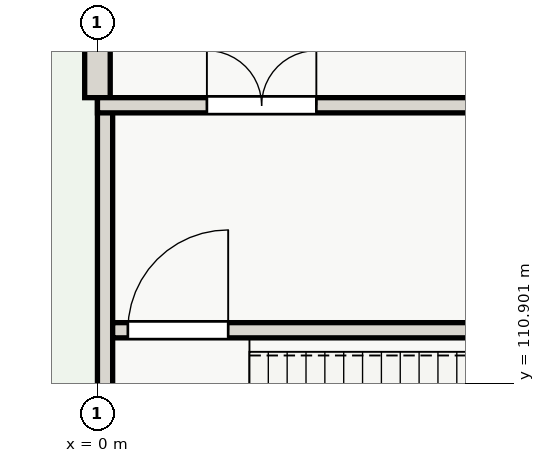
"""IFC4 building model, lengths in metres.
Left out: names, types, materials, properties, quantities, classifications, styles, units other than length and angle.
Written with IfcOpenShell. Run it as: python <this file> out.ifc"""

import sys

from ifc_helpers import new_model, si_unit, direction, frame, frame_2d, origin, place, context, subcontext, project, spatial, rectangle, extrude, element, fill, save


model = new_model("IFC4")
c1 = context("Model", 3, precision=1e-05, world=origin(), true_north=direction((0.0, 1.0)))
c2 = subcontext(c1, "Body", "Model", "MODEL_VIEW")
j1 = project(units=[si_unit("LENGTHUNIT", "METRE"), si_unit("PLANEANGLEUNIT", "RADIAN")], contexts=[c1])
p1 = place(None, origin())
s1 = spatial("IfcSite", under=j1, at=p1, CompositionType="ELEMENT")
p2 = place(p1, origin())
s2 = spatial("IfcBuilding", under=s1, at=p2, CompositionType="ELEMENT")
p3 = place(p2, origin())
s3 = spatial("IfcBuildingStorey", under=s2, at=p3, CompositionType="ELEMENT", Elevation=0.0)
p4 = place(p3, frame((0.0, 115.6, 0.0), z_axis=(0.0, 0.0, 1.0), x_axis=(0.0, 1.0, 0.0)))
e1 = element("IfcWall", 1, at=p4, inside=s3, PredefinedType="SOLIDWALL", context=c2, shape_type="SweptSolid", body=[
    extrude(rectangle(XDim=4.4, YDim=0.42, at=frame_2d((2.2, 0.0))), origin(), (0.0, 0.0, 1.0), 3.35),
])
p5 = place(p4, frame((1.3, 0.0, 0.9)))
e2 = element("IfcOpeningElement", 2, at=p5, cuts=e1, PredefinedType="OPENING", context=c2, shape_type="SweptSolid", body=[
    extrude(rectangle(XDim=1.8, YDim=2.05, at=frame_2d((0.9, 1.025))), frame((0.0, 0.22, 0.0), z_axis=(0.0, -1.0, 0.0), x_axis=(1.0, 0.0, 0.0)), (0.0, 0.0, 1.0), 0.44),
])
p6 = place(p3, frame((0.125, 106.4, 0.0), z_axis=(0.0, 0.0, 1.0), x_axis=(0.0, 1.0, 0.0)))
e3 = element("IfcWall", 3, at=p6, inside=s3, PredefinedType="SHEAR", context=c2, shape_type="SweptSolid", body=[
    extrude(rectangle(XDim=9.2, YDim=0.25, at=frame_2d((4.6, 0.0))), origin(), (0.0, 0.0, 1.0), 4.2),
])
p7 = place(p6, frame((1.4, 0.0, 0.0)))
e4 = element("IfcOpeningElement", 4, at=p7, cuts=e3, PredefinedType="OPENING", context=c2, shape_type="SweptSolid", body=[
    extrude(rectangle(XDim=1.9, YDim=2.2, at=frame_2d((0.95, 1.1))), frame((0.0, 0.135, 0.0), z_axis=(0.0, -1.0, 0.0), x_axis=(1.0, 0.0, 0.0)), (0.0, 0.0, 1.0), 0.27),
])
p8 = place(p3, frame((0.0, 115.475, 0.0), z_axis=(0.0, 0.0, 1.0), x_axis=(1.0, 0.0, 0.0)))
e5 = element("IfcWall", 5, at=p8, inside=s3, PredefinedType="SHEAR", context=c2, shape_type="SweptSolid", body=[
    extrude(rectangle(XDim=9.2, YDim=0.25, at=frame_2d((4.6, 0.0))), origin(), (0.0, 0.0, 1.0), 4.2),
])
p9 = place(p8, frame((1.8, 0.0, 0.0)))
e6 = element("IfcOpeningElement", 6, at=p9, cuts=e5, PredefinedType="OPENING", context=c2, shape_type="SweptSolid", body=[
    extrude(rectangle(XDim=1.8, YDim=2.15, at=frame_2d((0.9, 1.075))), frame((0.0, 0.135, 0.0), z_axis=(0.0, -1.0, 0.0), x_axis=(1.0, 0.0, 0.0)), (0.0, 0.0, 1.0), 0.27),
])
p10 = place(p3, frame((0.25, 111.775, 0.0), z_axis=(0.0, 0.0, 1.0), x_axis=(1.0, 0.0, 0.0)))
e7 = element("IfcWall", 7, at=p10, inside=s3, PredefinedType="SHEAR", context=c2, shape_type="SweptSolid", body=[
    extrude(rectangle(XDim=8.7, YDim=0.25, at=frame_2d((4.35, 0.0))), origin(), (0.0, 0.0, 1.0), 4.2),
])
p11 = place(p10, frame((0.25, 0.0, 0.0)))
e8 = element("IfcOpeningElement", 8, at=p11, cuts=e7, PredefinedType="OPENING", context=c2, shape_type="SweptSolid", body=[
    extrude(rectangle(XDim=1.65, YDim=2.1, at=frame_2d((0.825, 1.05))), frame((0.0, 0.135, 0.0), z_axis=(0.0, -1.0, 0.0), x_axis=(1.0, 0.0, 0.0)), (0.0, 0.0, 1.0), 0.27),
])
p12 = place(p9, origin())
e9 = element("IfcDoor", 9, at=p12, inside=s3, OperationType="DOUBLE_DOOR_SINGLE_SWING", PredefinedType="DOOR", context=c2, shape_type="SweptSolid", body=[
    extrude(rectangle(XDim=1.8, YDim=2.15, at=frame_2d((0.9, 1.075))), frame((0.0, 0.025, 0.0), z_axis=(0.0, -1.0, 0.0), x_axis=(1.0, 0.0, 0.0)), (0.0, 0.0, 1.0), 0.05),
])
fill(e6, e9)
p13 = place(p11, origin())
e10 = element("IfcDoor", 10, at=p13, inside=s3, OperationType="SINGLE_SWING_RIGHT", PredefinedType="DOOR", context=c2, shape_type="SweptSolid", body=[
    extrude(rectangle(XDim=1.65, YDim=2.1, at=frame_2d((0.825, 1.05))), frame((0.0, 0.025, 0.0), z_axis=(0.0, -1.0, 0.0), x_axis=(1.0, 0.0, 0.0)), (0.0, 0.0, 1.0), 0.05),
])
fill(e8, e10)
save(model, sys.argv[1])
